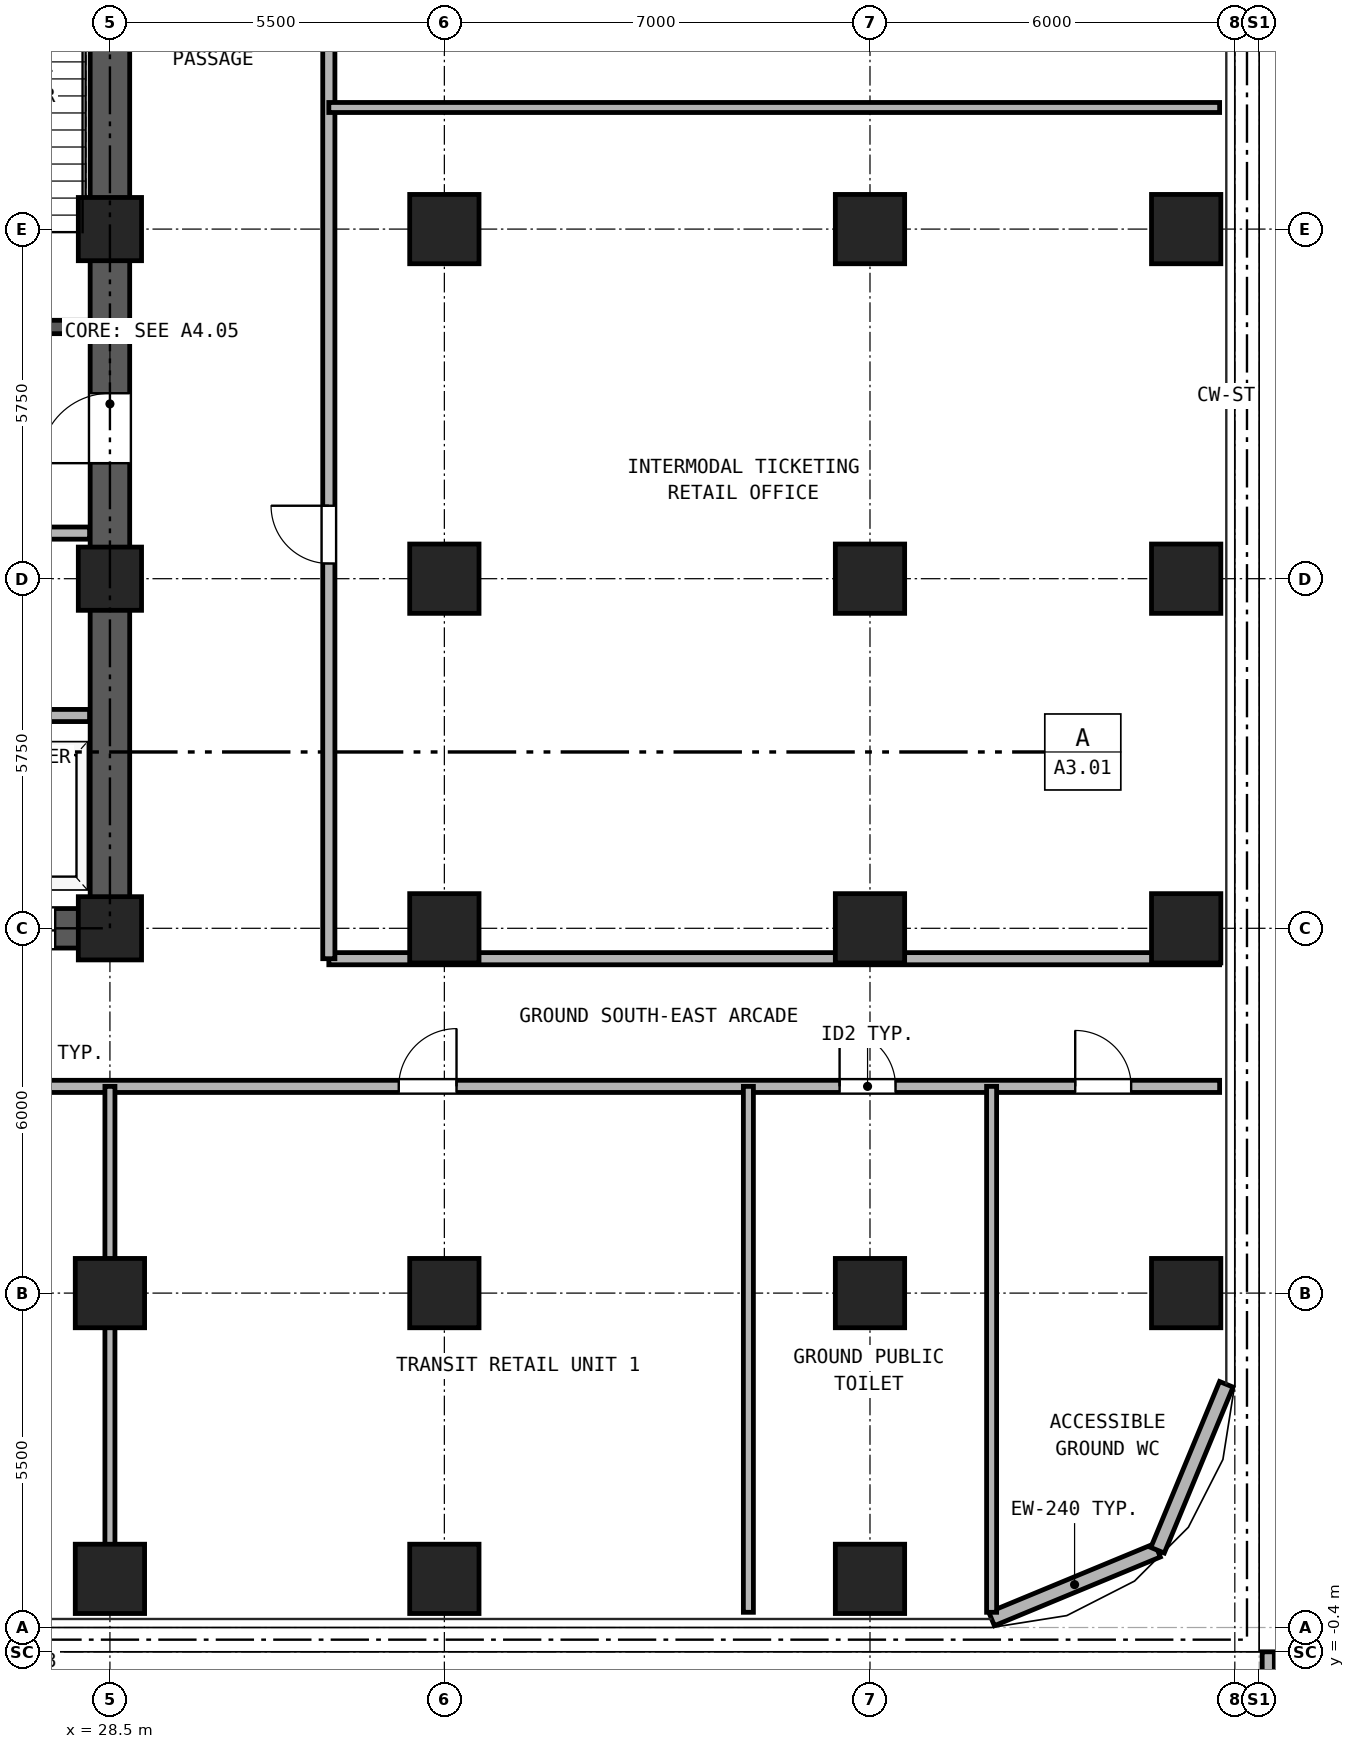
"""IFC4 building model, lengths in metres.
Left out: names, types, materials, properties, quantities, classifications, styles, units other than length and angle.
Written with IfcOpenShell. Run it as: python <this file> out.ifc"""

import sys

from ifc_helpers import new_model, si_unit, direction, frame, frame_2d, origin, origin_2d, place, context, subcontext, project, spatial, rectangle, hollow_rectangle, extrude, source, transform, mapped, element, fill, save


model = new_model("IFC4")
c1 = context("Model", 3, precision=1e-05, world=origin(), true_north=direction((0.0, 1.0)))
c2 = subcontext(c1, "Body", "Model", "MODEL_VIEW")
j1 = project(units=[si_unit("LENGTHUNIT", "METRE"), si_unit("PLANEANGLEUNIT", "RADIAN")], contexts=[c1])
p1 = place(None, origin())
s1 = spatial("IfcSite", under=j1, at=p1, CompositionType="ELEMENT")
p2 = place(p1, origin())
s2 = spatial("IfcBuilding", under=s1, at=p2, CompositionType="ELEMENT")
p3 = place(p2, origin())
s3 = spatial("IfcBuildingStorey", under=s2, at=p3, CompositionType="ELEMENT", Elevation=0.0)
m1 = source(origin(), c2, "Body", "SweptSolid", [
    extrude(hollow_rectangle(XDim=1.14, YDim=1.14, WallThickness=0.07, at=origin_2d()), origin(), (0.0, 0.0, 1.0), 4.18),
])
for number, where, z_axis, x_axis in (
    (1, (28.5, 0.8, 0.0), (0.0, 0.0, 1.0), (1.0, 0.0, 0.0)),
    (2, (34.0, 0.8, 0.0), (0.0, 0.0, 1.0), (1.0, 0.0, 0.0)),
    (3, (41.0, 0.8, 0.0), (0.0, 0.0, 1.0), (1.0, 0.0, 0.0)),
    (4, (46.2, 5.5, 0.0), (0.0, 0.0, 1.0), (1.0, 0.0, 0.0)),
    (5, (46.2, 11.5, 0.0), (0.0, 0.0, 1.0), (1.0, 0.0, 0.0)),
    (6, (46.2, 17.25, 0.0), (0.0, 0.0, 1.0), (1.0, 0.0, 0.0)),
    (7, (46.2, 23.0, 0.0), (0.0, 0.0, 1.0), (1.0, 0.0, 0.0)),
    (8, (28.5, 5.5, 0.0), (0.0, 0.0, 1.0), (1.0, 0.0, 0.0)),
):
    element("IfcColumn", number, at=place(p3, frame(where, z_axis=z_axis, x_axis=x_axis)), inside=s3, PredefinedType="COLUMN", context=c2, shape_type="MappedRepresentation", body=[
        mapped(m1, transform((0.0, 0.0, 0.0), x_axis=(1.0, 0.0, 0.0), y_axis=(0.0, 1.0, 0.0), z_axis=(0.0, 0.0, 1.0), scale=1.0)),
    ])
m2 = source(origin(), c2, "Body", "SweptSolid", [
    extrude(hollow_rectangle(XDim=1.04, YDim=1.04, WallThickness=0.065, at=origin_2d()), origin(), (0.0, 0.0, 1.0), 4.18),
])
for number, where, z_axis, x_axis in (
    (9, (28.5, 11.5, 0.0), (0.0, 0.0, 1.0), (1.0, 0.0, 0.0)),
    (10, (28.5, 17.25, 0.0), (0.0, 0.0, 1.0), (1.0, 0.0, 0.0)),
    (11, (28.5, 23.0, 0.0), (0.0, 0.0, 1.0), (1.0, 0.0, 0.0)),
):
    element("IfcColumn", number, at=place(p3, frame(where, z_axis=z_axis, x_axis=x_axis)), inside=s3, PredefinedType="COLUMN", context=c2, shape_type="MappedRepresentation", body=[
        mapped(m2, transform((0.0, 0.0, 0.0), x_axis=(1.0, 0.0, 0.0), y_axis=(0.0, 1.0, 0.0), z_axis=(0.0, 0.0, 1.0), scale=1.0)),
    ])
for number, where, z_axis, x_axis in (
    (12, (34.0, 5.5, 0.0), (0.0, 0.0, 1.0), (1.0, 0.0, 0.0)),
    (13, (34.0, 11.5, 0.0), (0.0, 0.0, 1.0), (1.0, 0.0, 0.0)),
    (14, (34.0, 17.25, 0.0), (0.0, 0.0, 1.0), (1.0, 0.0, 0.0)),
    (15, (34.0, 23.0, 0.0), (0.0, 0.0, 1.0), (1.0, 0.0, 0.0)),
    (16, (41.0, 5.5, 0.0), (0.0, 0.0, 1.0), (1.0, 0.0, 0.0)),
    (17, (41.0, 11.5, 0.0), (0.0, 0.0, 1.0), (1.0, 0.0, 0.0)),
    (18, (41.0, 17.25, 0.0), (0.0, 0.0, 1.0), (1.0, 0.0, 0.0)),
    (19, (41.0, 23.0, 0.0), (0.0, 0.0, 1.0), (1.0, 0.0, 0.0)),
):
    element("IfcColumn", number, at=place(p3, frame(where, z_axis=z_axis, x_axis=x_axis)), inside=s3, PredefinedType="COLUMN", context=c2, shape_type="MappedRepresentation", body=[
        mapped(m1, transform((0.0, 0.0, 0.0), x_axis=(1.0, 0.0, 0.0), y_axis=(0.0, 1.0, 0.0), z_axis=(0.0, 0.0, 1.0), scale=1.0)),
    ])
for number, where, z_axis, x_axis in (
    (20, (43.0, 0.14, 0.0), (0.0, 0.0, 1.0), (0.924, 0.383, 0.0)),
    (21, (45.729, 1.271, 0.0), (0.0, 0.0, 1.0), (0.383, 0.924, 0.0)),
):
    element("IfcWall", number, at=place(p3, frame(where, z_axis=z_axis, x_axis=x_axis)), inside=s3, PredefinedType="SOLIDWALL", context=c2, shape_type="SweptSolid", body=[
        extrude(rectangle(XDim=2.954, YDim=0.24, at=frame_2d((1.477, 0.0))), origin(), (0.0, 0.0, 1.0), 4.18),
    ])
p4 = place(p3, frame((18.175, 11.5, 0.0), z_axis=(0.0, 0.0, 1.0), x_axis=(1.0, 0.0, 0.0)))
e22 = element("IfcWall", 22, at=p4, inside=s3, PredefinedType="SHEAR", context=c2, shape_type="SweptSolid", body=[
    extrude(rectangle(XDim=10.65, YDim=0.65, at=frame_2d((5.325, 0.0))), origin(), (0.0, 0.0, 1.0), 4.18),
])
p5 = place(p4, frame((1.195, 0.0, 0.0)))
e23 = element("IfcOpeningElement", 23, at=p5, cuts=e22, PredefinedType="OPENING", context=c2, shape_type="SweptSolid", body=[
    extrude(rectangle(XDim=1.1, YDim=2.25, at=frame_2d((0.55, 1.125))), frame((0.0, 0.335, 0.0), z_axis=(0.0, -1.0, 0.0), x_axis=(1.0, 0.0, 0.0)), (0.0, 0.0, 1.0), 0.67),
])
p6 = place(p4, frame((3.495, 0.0, 0.0)))
e24 = element("IfcOpeningElement", 24, at=p6, cuts=e22, PredefinedType="OPENING", context=c2, shape_type="SweptSolid", body=[
    extrude(rectangle(XDim=1.1, YDim=2.25, at=frame_2d((0.55, 1.125))), frame((0.0, 0.335, 0.0), z_axis=(0.0, -1.0, 0.0), x_axis=(1.0, 0.0, 0.0)), (0.0, 0.0, 1.0), 0.67),
])
p7 = place(p4, frame((5.925, 0.0, 0.0)))
e25 = element("IfcOpeningElement", 25, at=p7, cuts=e22, PredefinedType="OPENING", context=c2, shape_type="SweptSolid", body=[
    extrude(rectangle(XDim=1.1, YDim=2.25, at=frame_2d((0.55, 1.125))), frame((0.0, 0.335, 0.0), z_axis=(0.0, -1.0, 0.0), x_axis=(1.0, 0.0, 0.0)), (0.0, 0.0, 1.0), 0.67),
])
p8 = place(p4, frame((8.325, 0.0, 0.0)))
e26 = element("IfcOpeningElement", 26, at=p8, cuts=e22, PredefinedType="OPENING", context=c2, shape_type="SweptSolid", body=[
    extrude(rectangle(XDim=1.1, YDim=2.25, at=frame_2d((0.55, 1.125))), frame((0.0, 0.335, 0.0), z_axis=(0.0, -1.0, 0.0), x_axis=(1.0, 0.0, 0.0)), (0.0, 0.0, 1.0), 0.67),
])
p9 = place(p3, frame((28.5, 11.825, 0.0), z_axis=(0.0, 0.0, 1.0), x_axis=(0.0, 1.0, 0.0)))
e27 = element("IfcWall", 27, at=p9, inside=s3, PredefinedType="SHEAR", context=c2, shape_type="SweptSolid", body=[
    extrude(rectangle(XDim=16.6, YDim=0.65, at=frame_2d((8.3, 0.0))), origin(), (0.0, 0.0, 1.0), 4.18),
])
p10 = place(p9, frame((7.325, 0.0, 0.0)))
e28 = element("IfcOpeningElement", 28, at=p10, cuts=e27, PredefinedType="OPENING", context=c2, shape_type="SweptSolid", body=[
    extrude(rectangle(XDim=1.15, YDim=2.2, at=frame_2d((0.575, 1.1))), frame((0.0, 0.335, 0.0), z_axis=(0.0, -1.0, 0.0), x_axis=(1.0, 0.0, 0.0)), (0.0, 0.0, 1.0), 0.67),
])
p11 = place(p3, frame((25.13, 21.39, 0.0), z_axis=(0.0, 0.0, 1.0), x_axis=(1.0, 0.0, 0.0)))
e29 = element("IfcWall", 29, at=p11, inside=s3, PredefinedType="SOLIDWALL", context=c2, shape_type="SweptSolid", body=[
    extrude(rectangle(XDim=3.035, YDim=0.22, at=frame_2d((1.518, 0.0))), origin(), (0.0, 0.0, 1.0), 4.18),
])
p12 = place(p11, frame((0.92, 0.0, 0.0)))
e30 = element("IfcOpeningElement", 30, at=p12, cuts=e29, PredefinedType="OPENING", context=c2, shape_type="SweptSolid", body=[
    extrude(rectangle(XDim=1.15, YDim=2.2, at=frame_2d((0.575, 1.1))), frame((0.0, 0.12, 0.0), z_axis=(0.0, -1.0, 0.0), x_axis=(1.0, 0.0, 0.0)), (0.0, 0.0, 1.0), 0.24),
])
p13 = place(p3, frame((18.835, 18.0, 0.0), z_axis=(0.0, 0.0, 1.0), x_axis=(1.0, 0.0, 0.0)))
e31 = element("IfcWall", 31, at=p13, inside=s3, PredefinedType="PARTITIONING", context=c2, shape_type="SweptSolid", body=[
    extrude(rectangle(XDim=9.33, YDim=0.2, at=frame_2d((4.665, 0.0))), origin(), (0.0, 0.0, 1.0), 4.18),
])
p14 = place(p13, frame((0.415, 0.0, 0.0)))
e32 = element("IfcOpeningElement", 32, at=p14, cuts=e31, PredefinedType="OPENING", context=c2, shape_type="SweptSolid", body=[
    extrude(rectangle(XDim=1.3, YDim=2.3, at=frame_2d((0.65, 1.15))), frame((0.0, 0.11, 0.0), z_axis=(0.0, -1.0, 0.0), x_axis=(1.0, 0.0, 0.0)), (0.0, 0.0, 1.0), 0.22),
])
p15 = place(p13, frame((2.515, 0.0, 0.0)))
e33 = element("IfcOpeningElement", 33, at=p15, cuts=e31, PredefinedType="OPENING", context=c2, shape_type="SweptSolid", body=[
    extrude(rectangle(XDim=1.3, YDim=2.3, at=frame_2d((0.65, 1.15))), frame((0.0, 0.11, 0.0), z_axis=(0.0, -1.0, 0.0), x_axis=(1.0, 0.0, 0.0)), (0.0, 0.0, 1.0), 0.22),
])
p16 = place(p13, frame((7.015, 0.0, 0.0)))
e34 = element("IfcOpeningElement", 34, at=p16, cuts=e31, PredefinedType="OPENING", context=c2, shape_type="SweptSolid", body=[
    extrude(rectangle(XDim=1.0, YDim=2.15, at=frame_2d((0.5, 1.075))), frame((0.0, 0.11, 0.0), z_axis=(0.0, -1.0, 0.0), x_axis=(1.0, 0.0, 0.0)), (0.0, 0.0, 1.0), 0.22),
])
p17 = place(p3, frame((18.835, 15.0, 0.0), z_axis=(0.0, 0.0, 1.0), x_axis=(1.0, 0.0, 0.0)))
e35 = element("IfcWall", 35, at=p17, inside=s3, PredefinedType="PARTITIONING", context=c2, shape_type="SweptSolid", body=[
    extrude(rectangle(XDim=9.33, YDim=0.2, at=frame_2d((4.665, 0.0))), origin(), (0.0, 0.0, 1.0), 4.18),
])
p18 = place(p3, frame((0.25, 8.9, 0.0), z_axis=(0.0, 0.0, 1.0), x_axis=(1.0, 0.0, 0.0)))
e36 = element("IfcWall", 36, at=p18, inside=s3, PredefinedType="PARTITIONING", context=c2, shape_type="SweptSolid", body=[
    extrude(rectangle(XDim=46.5, YDim=0.2, at=frame_2d((23.25, 0.0))), origin(), (0.0, 0.0, 1.0), 4.18),
])
p19 = place(p18, frame((10.25, 0.0, 0.0)))
e37 = element("IfcOpeningElement", 37, at=p19, cuts=e36, PredefinedType="OPENING", context=c2, shape_type="SweptSolid", body=[
    extrude(rectangle(XDim=1.0, YDim=2.15, at=frame_2d((0.5, 1.075))), frame((0.0, 0.11, 0.0), z_axis=(0.0, -1.0, 0.0), x_axis=(1.0, 0.0, 0.0)), (0.0, 0.0, 1.0), 0.22),
])
p20 = place(p18, frame((20.25, 0.0, 0.0)))
e38 = element("IfcOpeningElement", 38, at=p20, cuts=e36, PredefinedType="OPENING", context=c2, shape_type="SweptSolid", body=[
    extrude(rectangle(XDim=0.95, YDim=2.15, at=frame_2d((0.475, 1.075))), frame((0.0, 0.11, 0.0), z_axis=(0.0, -1.0, 0.0), x_axis=(1.0, 0.0, 0.0)), (0.0, 0.0, 1.0), 0.22),
])
p21 = place(p18, frame((33.0, 0.0, 0.0)))
e39 = element("IfcOpeningElement", 39, at=p21, cuts=e36, PredefinedType="OPENING", context=c2, shape_type="SweptSolid", body=[
    extrude(rectangle(XDim=0.95, YDim=2.15, at=frame_2d((0.475, 1.075))), frame((0.0, 0.11, 0.0), z_axis=(0.0, -1.0, 0.0), x_axis=(1.0, 0.0, 0.0)), (0.0, 0.0, 1.0), 0.22),
])
p22 = place(p18, frame((40.25, 0.0, 0.0)))
e40 = element("IfcOpeningElement", 40, at=p22, cuts=e36, PredefinedType="OPENING", context=c2, shape_type="SweptSolid", body=[
    extrude(rectangle(XDim=0.92, YDim=2.1, at=frame_2d((0.46, 1.05))), frame((0.0, 0.11, 0.0), z_axis=(0.0, -1.0, 0.0), x_axis=(1.0, 0.0, 0.0)), (0.0, 0.0, 1.0), 0.22),
])
p23 = place(p18, frame((44.125, 0.0, 0.0)))
e41 = element("IfcOpeningElement", 41, at=p23, cuts=e36, PredefinedType="OPENING", context=c2, shape_type="SweptSolid", body=[
    extrude(rectangle(XDim=0.92, YDim=2.1, at=frame_2d((0.46, 1.05))), frame((0.0, 0.11, 0.0), z_axis=(0.0, -1.0, 0.0), x_axis=(1.0, 0.0, 0.0)), (0.0, 0.0, 1.0), 0.22),
])
p24 = place(p3, frame((32.1, 11.0, 0.0), z_axis=(0.0, 0.0, 1.0), x_axis=(1.0, 0.0, 0.0)))
e42 = element("IfcWall", 42, at=p24, inside=s3, PredefinedType="PARTITIONING", context=c2, shape_type="SweptSolid", body=[
    extrude(rectangle(XDim=14.65, YDim=0.2, at=frame_2d((7.325, 0.0))), origin(), (0.0, 0.0, 1.0), 4.18),
])
p25 = place(p3, frame((32.1, 11.0, 0.0), z_axis=(0.0, 0.0, 1.0), x_axis=(0.0, 1.0, 0.0)))
e43 = element("IfcWall", 43, at=p25, inside=s3, PredefinedType="PARTITIONING", context=c2, shape_type="SweptSolid", body=[
    extrude(rectangle(XDim=29.25, YDim=0.2, at=frame_2d((14.625, 0.0))), origin(), (0.0, 0.0, 1.0), 4.18),
])
p26 = place(p25, frame((6.5, 0.0, 0.0)))
e44 = element("IfcOpeningElement", 44, at=p26, cuts=e43, PredefinedType="OPENING", context=c2, shape_type="SweptSolid", body=[
    extrude(rectangle(XDim=0.95, YDim=2.15, at=frame_2d((0.475, 1.075))), frame((0.0, 0.11, 0.0), z_axis=(0.0, -1.0, 0.0), x_axis=(1.0, 0.0, 0.0)), (0.0, 0.0, 1.0), 0.22),
])
p27 = place(p25, frame((21.125, 0.0, 0.0)))
e45 = element("IfcOpeningElement", 45, at=p27, cuts=e43, PredefinedType="OPENING", context=c2, shape_type="SweptSolid", body=[
    extrude(rectangle(XDim=0.95, YDim=2.15, at=frame_2d((0.475, 1.075))), frame((0.0, 0.11, 0.0), z_axis=(0.0, -1.0, 0.0), x_axis=(1.0, 0.0, 0.0)), (0.0, 0.0, 1.0), 0.22),
])
p28 = place(p3, frame((28.5, 0.25, 0.0), z_axis=(0.0, 0.0, 1.0), x_axis=(0.0, 1.0, 0.0)))
e46 = element("IfcWall", 46, at=p28, inside=s3, PredefinedType="PARTITIONING", context=c2, shape_type="SweptSolid", body=[
    extrude(rectangle(XDim=8.65, YDim=0.165, at=frame_2d((4.325, 0.0))), origin(), (0.0, 0.0, 1.0), 3.253),
])
for number, where, z_axis, x_axis in (
    (47, (39.0, 0.25, 0.0), (0.0, 0.0, 1.0), (0.0, 1.0, 0.0)),
    (48, (43.0, 0.25, 0.0), (0.0, 0.0, 1.0), (0.0, 1.0, 0.0)),
):
    element("IfcWall", number, at=place(p3, frame(where, z_axis=z_axis, x_axis=x_axis)), inside=s3, PredefinedType="PARTITIONING", context=c2, shape_type="SweptSolid", body=[
        extrude(rectangle(XDim=8.65, YDim=0.165, at=frame_2d((4.325, 0.0))), origin(), (0.0, 0.0, 1.0), 4.18),
    ])
p29 = place(p3, frame((32.1, 25.0, 0.0), z_axis=(0.0, 0.0, 1.0), x_axis=(1.0, 0.0, 0.0)))
e49 = element("IfcWall", 49, at=p29, inside=s3, PredefinedType="PARTITIONING", context=c2, shape_type="SweptSolid", body=[
    extrude(rectangle(XDim=14.65, YDim=0.165, at=frame_2d((7.325, 0.0))), origin(), (0.0, 0.0, 1.0), 4.18),
])
p30 = place(p3, frame((47.55, -10.95, 0.0), z_axis=(0.0, 0.0, 1.0), x_axis=(0.0, 1.0, 0.0)))
e50 = element("IfcWall", 50, at=p30, inside=s3, PredefinedType="PARTITIONING", context=c2, shape_type="SweptSolid", body=[
    extrude(rectangle(XDim=10.55, YDim=0.2, at=frame_2d((5.275, 0.0))), origin(), (0.0, 0.0, 1.0), 4.18),
])
p31 = place(p30, frame((5.35, 0.0, 0.0)))
e51 = element("IfcOpeningElement", 51, at=p31, cuts=e50, PredefinedType="OPENING", context=c2, shape_type="SweptSolid", body=[
    extrude(rectangle(XDim=1.3, YDim=2.2, at=frame_2d((0.65, 1.1))), frame((0.0, 0.11, 0.0), z_axis=(0.0, -1.0, 0.0), x_axis=(1.0, 0.0, 0.0)), (0.0, 0.0, 1.0), 0.22),
])
p32 = place(p10, origin())
e52 = element("IfcDoor", 52, at=p32, inside=s3, OperationType="SINGLE_SWING_LEFT", PredefinedType="DOOR", context=c2, shape_type="SweptSolid", body=[
    extrude(rectangle(XDim=1.15, YDim=2.2, at=frame_2d((0.575, 1.1))), frame((0.0, 0.025, 0.0), z_axis=(0.0, -1.0, 0.0), x_axis=(1.0, 0.0, 0.0)), (0.0, 0.0, 1.0), 0.05),
])
fill(e28, e52)
p33 = place(p8, frame((1.1, 0.0, 0.0), z_axis=(0.0, 0.0, 1.0), x_axis=(-1.0, 0.0, 0.0)))
e53 = element("IfcDoor", 53, at=p33, inside=s3, OperationType="DOUBLE_DOOR_SLIDING", PredefinedType="DOOR", context=c2, shape_type="SweptSolid", body=[
    extrude(rectangle(XDim=1.1, YDim=2.25, at=frame_2d((0.55, 1.125))), frame((0.0, 0.025, 0.0), z_axis=(0.0, -1.0, 0.0), x_axis=(1.0, 0.0, 0.0)), (0.0, 0.0, 1.0), 0.05),
])
fill(e26, e53)
p34 = place(p21, frame((0.95, 0.0, 0.0), z_axis=(0.0, 0.0, 1.0), x_axis=(-1.0, 0.0, 0.0)))
e54 = element("IfcDoor", 54, at=p34, inside=s3, OperationType="SINGLE_SWING_RIGHT", PredefinedType="DOOR", context=c2, shape_type="SweptSolid", body=[
    extrude(rectangle(XDim=0.95, YDim=2.15, at=frame_2d((0.475, 1.075))), frame((0.0, 0.025, 0.0), z_axis=(0.0, -1.0, 0.0), x_axis=(1.0, 0.0, 0.0)), (0.0, 0.0, 1.0), 0.05),
])
fill(e39, e54)
p35 = place(p22, frame((0.92, 0.0, 0.0), z_axis=(0.0, 0.0, 1.0), x_axis=(-1.0, 0.0, 0.0)))
e55 = element("IfcDoor", 55, at=p35, inside=s3, OperationType="SINGLE_SWING_LEFT", PredefinedType="DOOR", context=c2, shape_type="SweptSolid", body=[
    extrude(rectangle(XDim=0.92, YDim=2.1, at=frame_2d((0.46, 1.05))), frame((0.0, 0.025, 0.0), z_axis=(0.0, -1.0, 0.0), x_axis=(1.0, 0.0, 0.0)), (0.0, 0.0, 1.0), 0.05),
])
fill(e40, e55)
p36 = place(p23, frame((0.92, 0.0, 0.0), z_axis=(0.0, 0.0, 1.0), x_axis=(-1.0, 0.0, 0.0)))
e56 = element("IfcDoor", 56, at=p36, inside=s3, OperationType="SINGLE_SWING_LEFT", PredefinedType="DOOR", context=c2, shape_type="SweptSolid", body=[
    extrude(rectangle(XDim=0.92, YDim=2.1, at=frame_2d((0.46, 1.05))), frame((0.0, 0.025, 0.0), z_axis=(0.0, -1.0, 0.0), x_axis=(1.0, 0.0, 0.0)), (0.0, 0.0, 1.0), 0.05),
])
fill(e41, e56)
p37 = place(p26, origin())
e57 = element("IfcDoor", 57, at=p37, inside=s3, OperationType="SINGLE_SWING_RIGHT", PredefinedType="DOOR", context=c2, shape_type="SweptSolid", body=[
    extrude(rectangle(XDim=0.95, YDim=2.15, at=frame_2d((0.475, 1.075))), frame((0.0, 0.025, 0.0), z_axis=(0.0, -1.0, 0.0), x_axis=(1.0, 0.0, 0.0)), (0.0, 0.0, 1.0), 0.05),
])
fill(e44, e57)
save(model, sys.argv[1])
